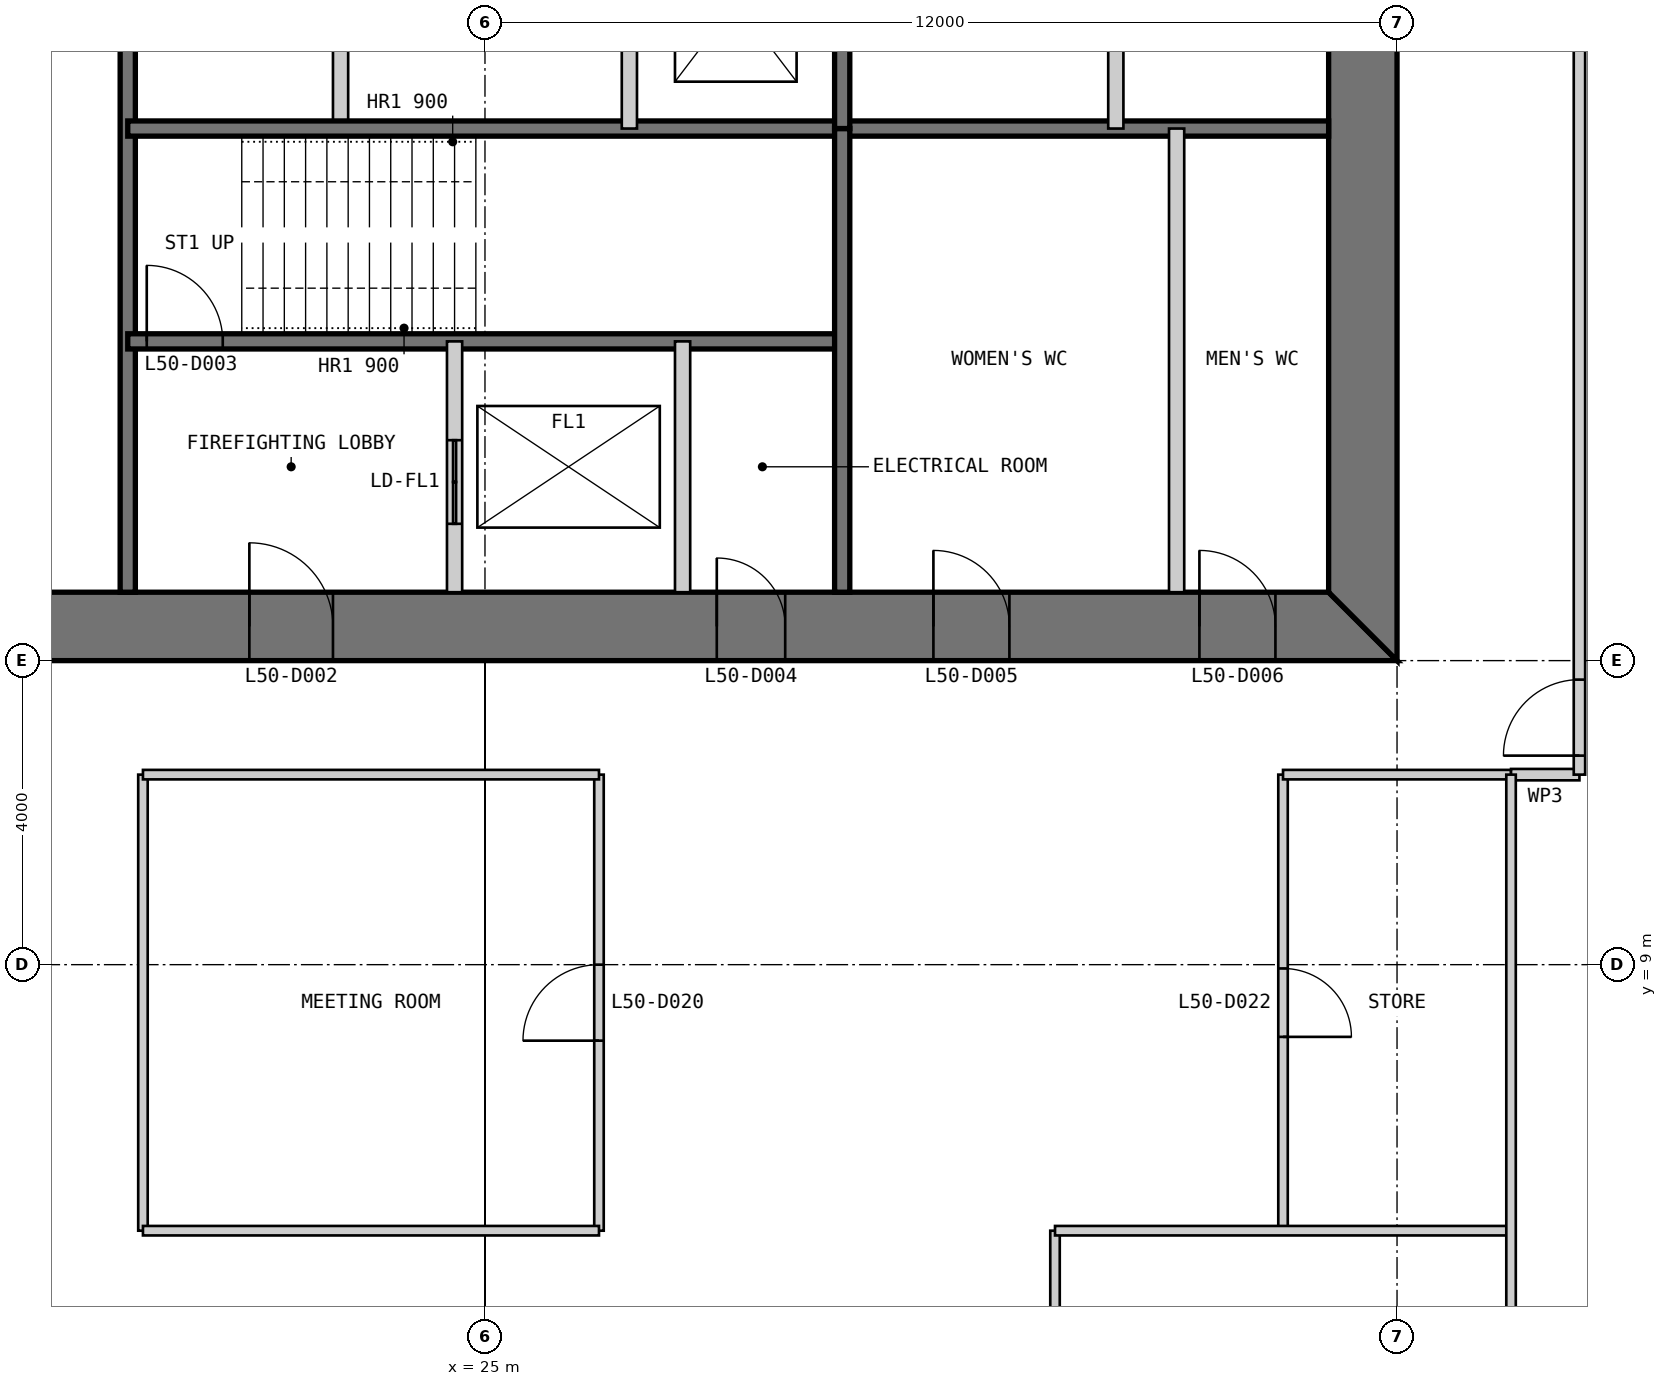
"""IFC4 building model, lengths in metres.
Left out: names, types, materials, properties, quantities, classifications, styles, units other than length and angle.
Written with IfcOpenShell. Run it as: python <this file> out.ifc"""

import sys

from ifc_helpers import new_model, si_unit, direction, frame, frame_2d, origin, place, context, subcontext, project, spatial, polyline, rectangle, outline, extrude, element, fill, save


model = new_model("IFC4")
c1 = context("Model", 3, precision=1e-05, world=origin(), true_north=direction((0.0, 1.0)))
c2 = subcontext(c1, "Body", "Model", "MODEL_VIEW")
j1 = project(units=[si_unit("LENGTHUNIT", "METRE"), si_unit("PLANEANGLEUNIT", "RADIAN")], contexts=[c1])
p1 = place(None, origin())
s1 = spatial("IfcSite", under=j1, at=p1, CompositionType="ELEMENT")
p2 = place(p1, origin())
s2 = spatial("IfcBuilding", under=s1, at=p2, CompositionType="ELEMENT")
p3 = place(p2, frame((0.0, 0.0, 213.8)))
s3 = spatial("IfcBuildingStorey", under=s2, at=p3, CompositionType="ELEMENT", Elevation=213.8)
p4 = place(p3, frame((13.0, 13.45, 0.0), z_axis=(0.0, 0.0, 1.0), x_axis=(1.0, 0.0, 0.0)))
e1 = element("IfcWall", 1, at=p4, inside=s3, PredefinedType="SHEAR", context=c2, shape_type="SweptSolid", body=[
    extrude(outline(polyline([(0.0, -0.45), (24.0, -0.45), (23.1, 0.45), (0.9, 0.45), (0.0, -0.45)])), origin(), (0.0, 0.0, 1.0), 4.0),
])
p5 = place(p4, frame((4.9, 0.0, 0.0)))
e2 = element("IfcOpeningElement", 2, at=p5, cuts=e1, PredefinedType="OPENING", context=c2, shape_type="SweptSolid", body=[
    extrude(rectangle(XDim=1.0, YDim=2.2, at=frame_2d((0.5, 1.1))), frame((0.0, 0.46, 0.0), z_axis=(0.0, -1.0, 0.0), x_axis=(1.0, 0.0, 0.0)), (0.0, 0.0, 1.0), 0.92),
])
p6 = place(p4, frame((8.9, 0.0, 0.0)))
e3 = element("IfcOpeningElement", 3, at=p6, cuts=e1, PredefinedType="OPENING", context=c2, shape_type="SweptSolid", body=[
    extrude(rectangle(XDim=1.1, YDim=2.2, at=frame_2d((0.55, 1.1))), frame((0.0, 0.46, 0.0), z_axis=(0.0, -1.0, 0.0), x_axis=(1.0, 0.0, 0.0)), (0.0, 0.0, 1.0), 0.92),
])
p7 = place(p4, frame((15.05, 0.0, 0.0)))
e4 = element("IfcOpeningElement", 4, at=p7, cuts=e1, PredefinedType="OPENING", context=c2, shape_type="SweptSolid", body=[
    extrude(rectangle(XDim=0.9, YDim=2.2, at=frame_2d((0.45, 1.1))), frame((0.0, 0.46, 0.0), z_axis=(0.0, -1.0, 0.0), x_axis=(1.0, 0.0, 0.0)), (0.0, 0.0, 1.0), 0.92),
])
p8 = place(p4, frame((17.9, 0.0, 0.0)))
e5 = element("IfcOpeningElement", 5, at=p8, cuts=e1, PredefinedType="OPENING", context=c2, shape_type="SweptSolid", body=[
    extrude(rectangle(XDim=1.0, YDim=2.2, at=frame_2d((0.5, 1.1))), frame((0.0, 0.46, 0.0), z_axis=(0.0, -1.0, 0.0), x_axis=(1.0, 0.0, 0.0)), (0.0, 0.0, 1.0), 0.92),
])
p9 = place(p4, frame((21.4, 0.0, 0.0)))
e6 = element("IfcOpeningElement", 6, at=p9, cuts=e1, PredefinedType="OPENING", context=c2, shape_type="SweptSolid", body=[
    extrude(rectangle(XDim=1.0, YDim=2.2, at=frame_2d((0.5, 1.1))), frame((0.0, 0.46, 0.0), z_axis=(0.0, -1.0, 0.0), x_axis=(1.0, 0.0, 0.0)), (0.0, 0.0, 1.0), 0.92),
])
p10 = place(p3, frame((36.55, 13.9, 0.0), z_axis=(0.0, 0.0, 1.0), x_axis=(0.0, 1.0, 0.0)))
e7 = element("IfcWall", 7, at=p10, inside=s3, PredefinedType="SHEAR", context=c2, shape_type="SweptSolid", body=[
    extrude(outline(polyline([(-0.9, -0.45), (23.1, -0.45), (22.2, 0.45), (0.0, 0.45), (-0.9, -0.45)])), origin(), (0.0, 0.0, 1.0), 4.0),
])
p11 = place(p10, frame((20.2, 0.0, 0.0)))
e8 = element("IfcOpeningElement", 8, at=p11, cuts=e7, PredefinedType="OPENING", context=c2, shape_type="SweptSolid", body=[
    extrude(rectangle(XDim=1.0, YDim=2.2, at=frame_2d((0.5, 1.1))), frame((0.0, 0.46, 0.0), z_axis=(0.0, -1.0, 0.0), x_axis=(1.0, 0.0, 0.0)), (0.0, 0.0, 1.0), 0.92),
])
p12 = place(p10, frame((17.25, 0.0, 0.0)))
e9 = element("IfcOpeningElement", 9, at=p12, cuts=e7, PredefinedType="OPENING", context=c2, shape_type="SweptSolid", body=[
    extrude(rectangle(XDim=0.9, YDim=2.2, at=frame_2d((0.45, 1.1))), frame((0.0, 0.46, 0.0), z_axis=(0.0, -1.0, 0.0), x_axis=(1.0, 0.0, 0.0)), (0.0, 0.0, 1.0), 0.92),
])
p13 = place(p3, frame((20.3, 13.9, 0.0), z_axis=(0.0, 0.0, 1.0), x_axis=(0.0, 1.0, 0.0)))
e10 = element("IfcWall", 10, at=p13, inside=s3, PredefinedType="SOLIDWALL", context=c2, shape_type="SweptSolid", body=[
    extrude(rectangle(XDim=16.1, YDim=0.2, at=frame_2d((8.05, 0.0))), origin(), (0.0, 0.0, 1.0), 3.8),
])
p14 = place(p13, frame((10.65, 0.0, 0.0)))
e11 = element("IfcOpeningElement", 11, at=p14, cuts=e10, PredefinedType="OPENING", context=c2, shape_type="SweptSolid", body=[
    extrude(rectangle(XDim=0.9, YDim=2.2, at=frame_2d((0.45, 1.1))), frame((0.0, 0.11, 0.0), z_axis=(0.0, -1.0, 0.0), x_axis=(1.0, 0.0, 0.0)), (0.0, 0.0, 1.0), 0.22),
])
p15 = place(p3, frame((23.1, 20.0, 0.0), z_axis=(0.0, 0.0, 1.0), x_axis=(0.0, 1.0, 0.0)))
e12 = element("IfcWall", 12, at=p15, inside=s3, PredefinedType="PARTITIONING", context=c2, shape_type="SweptSolid", body=[
    extrude(rectangle(XDim=10.0, YDim=0.2, at=frame_2d((5.0, 0.0))), origin(), (0.0, 0.0, 1.0), 3.8),
])
p16 = place(p3, frame((20.3, 17.2, 0.0), z_axis=(0.0, 0.0, 1.0), x_axis=(1.0, 0.0, 0.0)))
e13 = element("IfcWall", 13, at=p16, inside=s3, PredefinedType="SOLIDWALL", context=c2, shape_type="SweptSolid", body=[
    extrude(rectangle(XDim=9.4, YDim=0.2, at=frame_2d((4.7, 0.0))), origin(), (0.0, 0.0, 1.0), 3.8),
])
p17 = place(p16, frame((0.25, 0.0, 0.0)))
e14 = element("IfcOpeningElement", 14, at=p17, cuts=e13, PredefinedType="OPENING", context=c2, shape_type="SweptSolid", body=[
    extrude(rectangle(XDim=1.0, YDim=2.2, at=frame_2d((0.5, 1.1))), frame((0.0, 0.11, 0.0), z_axis=(0.0, -1.0, 0.0), x_axis=(1.0, 0.0, 0.0)), (0.0, 0.0, 1.0), 0.22),
])
p18 = place(p3, frame((20.3, 20.0, 0.0), z_axis=(0.0, 0.0, 1.0), x_axis=(1.0, 0.0, 0.0)))
e15 = element("IfcWall", 15, at=p18, inside=s3, PredefinedType="SOLIDWALL", context=c2, shape_type="SweptSolid", body=[
    extrude(rectangle(XDim=15.8, YDim=0.2, at=frame_2d((7.9, 0.0))), origin(), (0.0, 0.0, 1.0), 3.8),
])
p19 = place(p3, frame((24.6, 13.9, 0.0), z_axis=(0.0, 0.0, 1.0), x_axis=(0.0, 1.0, 0.0)))
e16 = element("IfcWall", 16, at=p19, inside=s3, PredefinedType="PARTITIONING", context=c2, shape_type="SweptSolid", body=[
    extrude(rectangle(XDim=3.3, YDim=0.2, at=frame_2d((1.65, 0.0))), origin(), (0.0, 0.0, 1.0), 3.8),
])
p20 = place(p19, frame((0.9, 0.0, 0.0)))
e17 = element("IfcOpeningElement", 17, at=p20, cuts=e16, PredefinedType="OPENING", context=c2, shape_type="SweptSolid", body=[
    extrude(rectangle(XDim=1.1, YDim=2.2, at=frame_2d((0.55, 1.1))), frame((0.0, 0.11, 0.0), z_axis=(0.0, -1.0, 0.0), x_axis=(1.0, 0.0, 0.0)), (0.0, 0.0, 1.0), 0.22),
])
p21 = place(p3, frame((27.6, 13.9, 0.0), z_axis=(0.0, 0.0, 1.0), x_axis=(0.0, 1.0, 0.0)))
e18 = element("IfcWall", 18, at=p21, inside=s3, PredefinedType="PARTITIONING", context=c2, shape_type="SweptSolid", body=[
    extrude(rectangle(XDim=3.3, YDim=0.2, at=frame_2d((1.65, 0.0))), origin(), (0.0, 0.0, 1.0), 3.8),
])
p22 = place(p3, frame((29.7, 13.9, 0.0), z_axis=(0.0, 0.0, 1.0), x_axis=(0.0, 1.0, 0.0)))
e19 = element("IfcWall", 19, at=p22, inside=s3, PredefinedType="SOLIDWALL", context=c2, shape_type="SweptSolid", body=[
    extrude(rectangle(XDim=6.1, YDim=0.2, at=frame_2d((3.05, 0.0))), origin(), (0.0, 0.0, 1.0), 3.8),
])
p23 = place(p3, frame((34.1, 13.9, 0.0), z_axis=(0.0, 0.0, 1.0), x_axis=(0.0, 1.0, 0.0)))
e20 = element("IfcWall", 20, at=p23, inside=s3, PredefinedType="PARTITIONING", context=c2, shape_type="SweptSolid", body=[
    extrude(rectangle(XDim=6.1, YDim=0.2, at=frame_2d((3.05, 0.0))), origin(), (0.0, 0.0, 1.0), 3.8),
])
p24 = place(p3, frame((33.3, 36.1, 0.0), z_axis=(0.0, 0.0, 1.0), x_axis=(0.0, -1.0, 0.0)))
e21 = element("IfcWall", 21, at=p24, inside=s3, PredefinedType="PARTITIONING", context=c2, shape_type="SweptSolid", body=[
    extrude(rectangle(XDim=16.1, YDim=0.2, at=frame_2d((8.05, 0.0))), origin(), (0.0, 0.0, 1.0), 3.8),
])
p25 = place(p3, frame((29.7, 36.1, 0.0), z_axis=(0.0, 0.0, 1.0), x_axis=(0.0, -1.0, 0.0)))
e22 = element("IfcWall", 22, at=p25, inside=s3, PredefinedType="SOLIDWALL", context=c2, shape_type="SweptSolid", body=[
    extrude(rectangle(XDim=16.1, YDim=0.2, at=frame_2d((8.05, 0.0))), origin(), (0.0, 0.0, 1.0), 3.8),
])
p26 = place(p25, frame((7.217, 0.0, 0.0)))
e23 = element("IfcOpeningElement", 23, at=p26, cuts=e22, PredefinedType="OPENING", context=c2, shape_type="SweptSolid", body=[
    extrude(rectangle(XDim=1.1, YDim=2.2, at=frame_2d((0.55, 1.1))), frame((0.0, 0.11, 0.0), z_axis=(0.0, -1.0, 0.0), x_axis=(1.0, 0.0, 0.0)), (0.0, 0.0, 1.0), 0.22),
])
p27 = place(p25, frame((10.55, 0.0, 0.0)))
e24 = element("IfcOpeningElement", 24, at=p27, cuts=e22, PredefinedType="OPENING", context=c2, shape_type="SweptSolid", body=[
    extrude(rectangle(XDim=1.1, YDim=2.2, at=frame_2d((0.55, 1.1))), frame((0.0, 0.11, 0.0), z_axis=(0.0, -1.0, 0.0), x_axis=(1.0, 0.0, 0.0)), (0.0, 0.0, 1.0), 0.22),
])
p28 = place(p25, frame((13.883, 0.0, 0.0)))
e25 = element("IfcOpeningElement", 25, at=p28, cuts=e22, PredefinedType="OPENING", context=c2, shape_type="SweptSolid", body=[
    extrude(rectangle(XDim=1.1, YDim=2.2, at=frame_2d((0.55, 1.1))), frame((0.0, 0.11, 0.0), z_axis=(0.0, -1.0, 0.0), x_axis=(1.0, 0.0, 0.0)), (0.0, 0.0, 1.0), 0.22),
])
p29 = place(p3, frame((26.9, 30.0, 0.0), z_axis=(0.0, 0.0, 1.0), x_axis=(0.0, -1.0, 0.0)))
e26 = element("IfcWall", 26, at=p29, inside=s3, PredefinedType="PARTITIONING", context=c2, shape_type="SweptSolid", body=[
    extrude(rectangle(XDim=10.0, YDim=0.2, at=frame_2d((5.0, 0.0))), origin(), (0.0, 0.0, 1.0), 3.8),
])
p30 = place(p3, frame((20.5, 5.5, 0.0), z_axis=(0.0, 0.0, 1.0), x_axis=(0.0, 1.0, 0.0)))
e27 = element("IfcWall", 27, at=p30, inside=s3, PredefinedType="PARTITIONING", context=c2, shape_type="SweptSolid", body=[
    extrude(rectangle(XDim=6.0, YDim=0.125, at=frame_2d((3.0, 0.0))), origin(), (0.0, 0.0, 1.0), 3.85),
])
p31 = place(p3, frame((26.5, 5.5, 0.0), z_axis=(0.0, 0.0, 1.0), x_axis=(0.0, 1.0, 0.0)))
e28 = element("IfcWall", 28, at=p31, inside=s3, PredefinedType="PARTITIONING", context=c2, shape_type="SweptSolid", body=[
    extrude(rectangle(XDim=6.0, YDim=0.125, at=frame_2d((3.0, 0.0))), origin(), (0.0, 0.0, 1.0), 3.85),
])
p32 = place(p31, frame((2.5, 0.0, 0.0)))
e29 = element("IfcOpeningElement", 29, at=p32, cuts=e28, PredefinedType="OPENING", context=c2, shape_type="SweptSolid", body=[
    extrude(rectangle(XDim=1.0, YDim=2.2, at=frame_2d((0.5, 1.1))), frame((0.0, 0.073, 0.0), z_axis=(0.0, -1.0, 0.0), x_axis=(1.0, 0.0, 0.0)), (0.0, 0.0, 1.0), 0.145),
])
p33 = place(p3, frame((32.5, 0.15, 0.0), z_axis=(0.0, 0.0, 1.0), x_axis=(0.0, 1.0, 0.0)))
e30 = element("IfcWall", 30, at=p33, inside=s3, PredefinedType="PARTITIONING", context=c2, shape_type="SweptSolid", body=[
    extrude(rectangle(XDim=5.35, YDim=0.125, at=frame_2d((2.675, 0.0))), origin(), (0.0, 0.0, 1.0), 3.85),
])
p34 = place(p33, frame((3.4, 0.0, 0.0)))
e31 = element("IfcOpeningElement", 31, at=p34, cuts=e30, PredefinedType="OPENING", context=c2, shape_type="SweptSolid", body=[
    extrude(rectangle(XDim=0.9, YDim=2.2, at=frame_2d((0.45, 1.1))), frame((0.0, 0.073, 0.0), z_axis=(0.0, -1.0, 0.0), x_axis=(1.0, 0.0, 0.0)), (0.0, 0.0, 1.0), 0.145),
])
p35 = place(p3, frame((35.5, 5.5, 0.0), z_axis=(0.0, 0.0, 1.0), x_axis=(0.0, 1.0, 0.0)))
e32 = element("IfcWall", 32, at=p35, inside=s3, PredefinedType="PARTITIONING", context=c2, shape_type="SweptSolid", body=[
    extrude(rectangle(XDim=6.0, YDim=0.125, at=frame_2d((3.0, 0.0))), origin(), (0.0, 0.0, 1.0), 3.85),
])
p36 = place(p35, frame((2.55, 0.0, 0.0)))
e33 = element("IfcOpeningElement", 33, at=p36, cuts=e32, PredefinedType="OPENING", context=c2, shape_type="SweptSolid", body=[
    extrude(rectangle(XDim=0.9, YDim=2.2, at=frame_2d((0.45, 1.1))), frame((0.0, 0.073, 0.0), z_axis=(0.0, -1.0, 0.0), x_axis=(1.0, 0.0, 0.0)), (0.0, 0.0, 1.0), 0.145),
])
for number, where, z_axis, x_axis in (
    (34, (20.5, 5.5, 0.0), (0.0, 0.0, 1.0), (1.0, 0.0, 0.0)),
    (35, (32.5, 5.5, 0.0), (0.0, 0.0, 1.0), (1.0, 0.0, 0.0)),
    (36, (20.5, 11.5, 0.0), (0.0, 0.0, 1.0), (1.0, 0.0, 0.0)),
):
    element("IfcWall", number, at=place(p3, frame(where, z_axis=z_axis, x_axis=x_axis)), inside=s3, PredefinedType="PARTITIONING", context=c2, shape_type="SweptSolid", body=[
        extrude(rectangle(XDim=6.0, YDim=0.125, at=frame_2d((3.0, 0.0))), origin(), (0.0, 0.0, 1.0), 3.85),
    ])
p37 = place(p3, frame((35.5, 11.5, 0.0), z_axis=(0.0, 0.0, 1.0), x_axis=(1.0, 0.0, 0.0)))
e37 = element("IfcWall", 37, at=p37, inside=s3, PredefinedType="PARTITIONING", context=c2, shape_type="SweptSolid", body=[
    extrude(rectangle(XDim=3.0, YDim=0.125, at=frame_2d((1.5, 0.0))), origin(), (0.0, 0.0, 1.0), 3.85),
])
p38 = place(p3, frame((38.5, 11.5, 0.0), z_axis=(0.0, 0.0, 1.0), x_axis=(1.0, 0.0, 0.0)))
e38 = element("IfcWall", 38, at=p38, inside=s3, PredefinedType="PARTITIONING", context=c2, shape_type="SweptSolid", body=[
    extrude(rectangle(XDim=0.9, YDim=0.15, at=frame_2d((0.45, 0.0))), origin(), (0.0, 0.0, 1.0), 3.85),
])
p39 = place(p3, frame((39.4, 11.5, 0.0), z_axis=(0.0, 0.0, 1.0), x_axis=(0.0, 1.0, 0.0)))
e39 = element("IfcWall", 39, at=p39, inside=s3, PredefinedType="PARTITIONING", context=c2, shape_type="SweptSolid", body=[
    extrude(rectangle(XDim=27.0, YDim=0.15, at=frame_2d((13.5, 0.0))), origin(), (0.0, 0.0, 1.0), 3.85),
])
p40 = place(p39, frame((0.25, 0.0, 0.0)))
e40 = element("IfcOpeningElement", 40, at=p40, cuts=e39, PredefinedType="OPENING", context=c2, shape_type="SweptSolid", body=[
    extrude(rectangle(XDim=1.0, YDim=2.2, at=frame_2d((0.5, 1.1))), frame((0.0, 0.085, 0.0), z_axis=(0.0, -1.0, 0.0), x_axis=(1.0, 0.0, 0.0)), (0.0, 0.0, 1.0), 0.17),
])
p41 = place(p39, frame((22.75, 0.0, 0.0)))
e41 = element("IfcOpeningElement", 41, at=p41, cuts=e39, PredefinedType="OPENING", context=c2, shape_type="SweptSolid", body=[
    extrude(rectangle(XDim=1.0, YDim=2.2, at=frame_2d((0.5, 1.1))), frame((0.0, 0.085, 0.0), z_axis=(0.0, -1.0, 0.0), x_axis=(1.0, 0.0, 0.0)), (0.0, 0.0, 1.0), 0.17),
])
p42 = place(p3, frame((38.5, 0.15, 0.0), z_axis=(0.0, 0.0, 1.0), x_axis=(0.0, 1.0, 0.0)))
e42 = element("IfcWall", 42, at=p42, inside=s3, PredefinedType="PARTITIONING", context=c2, shape_type="SweptSolid", body=[
    extrude(rectangle(XDim=11.35, YDim=0.125, at=frame_2d((5.675, 0.0))), origin(), (0.0, 0.0, 1.0), 3.85),
])
p43 = place(p6, origin())
e43 = element("IfcDoor", 43, at=p43, inside=s3, OperationType="SINGLE_SWING_LEFT", PredefinedType="DOOR", context=c2, shape_type="SweptSolid", body=[
    extrude(rectangle(XDim=1.1, YDim=2.2, at=frame_2d((0.55, 1.1))), frame((0.0, 0.025, 0.0), z_axis=(0.0, -1.0, 0.0), x_axis=(1.0, 0.0, 0.0)), (0.0, 0.0, 1.0), 0.05),
    extrude(outline(polyline([(0.0, 0.0), (0.04, 0.0), (0.04, 2.16), (1.06, 2.16), (1.06, 0.0), (1.1, 0.0), (1.1, 2.2), (0.0, 2.2), (0.0, 0.0)])), frame((0.0, 0.3, 0.0), z_axis=(0.0, -1.0, 0.0), x_axis=(1.0, 0.0, 0.0)), (0.0, 0.0, 1.0), 0.6),
])
fill(e3, e43)
p44 = place(p17, origin())
e44 = element("IfcDoor", 44, at=p44, inside=s3, OperationType="SINGLE_SWING_LEFT", PredefinedType="DOOR", context=c2, shape_type="SweptSolid", body=[
    extrude(rectangle(XDim=1.0, YDim=2.2, at=frame_2d((0.5, 1.1))), frame((0.0, 0.025, 0.0), z_axis=(0.0, -1.0, 0.0), x_axis=(1.0, 0.0, 0.0)), (0.0, 0.0, 1.0), 0.05),
])
fill(e14, e44)
p45 = place(p7, origin())
e45 = element("IfcDoor", 45, at=p45, inside=s3, OperationType="SINGLE_SWING_LEFT", PredefinedType="DOOR", context=c2, shape_type="SweptSolid", body=[
    extrude(rectangle(XDim=0.9, YDim=2.2, at=frame_2d((0.45, 1.1))), frame((0.0, 0.025, 0.0), z_axis=(0.0, -1.0, 0.0), x_axis=(1.0, 0.0, 0.0)), (0.0, 0.0, 1.0), 0.05),
    extrude(outline(polyline([(0.0, 0.0), (0.04, 0.0), (0.04, 2.16), (0.86, 2.16), (0.86, 0.0), (0.9, 0.0), (0.9, 2.2), (0.0, 2.2), (0.0, 0.0)])), frame((0.0, 0.3, 0.0), z_axis=(0.0, -1.0, 0.0), x_axis=(1.0, 0.0, 0.0)), (0.0, 0.0, 1.0), 0.6),
])
fill(e4, e45)
p46 = place(p8, origin())
e46 = element("IfcDoor", 46, at=p46, inside=s3, OperationType="SINGLE_SWING_LEFT", PredefinedType="DOOR", context=c2, shape_type="SweptSolid", body=[
    extrude(rectangle(XDim=1.0, YDim=2.2, at=frame_2d((0.5, 1.1))), frame((0.0, 0.025, 0.0), z_axis=(0.0, -1.0, 0.0), x_axis=(1.0, 0.0, 0.0)), (0.0, 0.0, 1.0), 0.05),
    extrude(outline(polyline([(0.0, 0.0), (0.04, 0.0), (0.04, 2.16), (0.96, 2.16), (0.96, 0.0), (1.0, 0.0), (1.0, 2.2), (0.0, 2.2), (0.0, 0.0)])), frame((0.0, 0.3, 0.0), z_axis=(0.0, -1.0, 0.0), x_axis=(1.0, 0.0, 0.0)), (0.0, 0.0, 1.0), 0.6),
])
fill(e5, e46)
p47 = place(p9, origin())
e47 = element("IfcDoor", 47, at=p47, inside=s3, OperationType="SINGLE_SWING_LEFT", PredefinedType="DOOR", context=c2, shape_type="SweptSolid", body=[
    extrude(rectangle(XDim=1.0, YDim=2.2, at=frame_2d((0.5, 1.1))), frame((0.0, 0.025, 0.0), z_axis=(0.0, -1.0, 0.0), x_axis=(1.0, 0.0, 0.0)), (0.0, 0.0, 1.0), 0.05),
    extrude(outline(polyline([(0.0, 0.0), (0.04, 0.0), (0.04, 2.16), (0.96, 2.16), (0.96, 0.0), (1.0, 0.0), (1.0, 2.2), (0.0, 2.2), (0.0, 0.0)])), frame((0.0, 0.3, 0.0), z_axis=(0.0, -1.0, 0.0), x_axis=(1.0, 0.0, 0.0)), (0.0, 0.0, 1.0), 0.6),
])
fill(e6, e47)
p48 = place(p32, origin())
e48 = element("IfcDoor", 48, at=p48, inside=s3, OperationType="SINGLE_SWING_LEFT", PredefinedType="DOOR", context=c2, shape_type="SweptSolid", body=[
    extrude(rectangle(XDim=1.0, YDim=2.2, at=frame_2d((0.5, 1.1))), frame((0.0, 0.025, 0.0), z_axis=(0.0, -1.0, 0.0), x_axis=(1.0, 0.0, 0.0)), (0.0, 0.0, 1.0), 0.05),
])
fill(e29, e48)
p49 = place(p36, frame((0.9, 0.0, 0.0), z_axis=(0.0, 0.0, 1.0), x_axis=(-1.0, 0.0, 0.0)))
e49 = element("IfcDoor", 49, at=p49, inside=s3, OperationType="SINGLE_SWING_RIGHT", PredefinedType="DOOR", context=c2, shape_type="SweptSolid", body=[
    extrude(rectangle(XDim=0.9, YDim=2.2, at=frame_2d((0.45, 1.1))), frame((0.0, 0.025, 0.0), z_axis=(0.0, -1.0, 0.0), x_axis=(1.0, 0.0, 0.0)), (0.0, 0.0, 1.0), 0.05),
])
fill(e33, e49)
p50 = place(p40, origin())
e50 = element("IfcDoor", 50, at=p50, inside=s3, OperationType="SINGLE_SWING_LEFT", PredefinedType="DOOR", context=c2, shape_type="SweptSolid", body=[
    extrude(rectangle(XDim=1.0, YDim=2.2, at=frame_2d((0.5, 1.1))), frame((0.0, 0.025, 0.0), z_axis=(0.0, -1.0, 0.0), x_axis=(1.0, 0.0, 0.0)), (0.0, 0.0, 1.0), 0.05),
])
fill(e40, e50)
p51 = place(p20, origin())
e51 = element("IfcDoor", 51, at=p51, inside=s3, OperationType="DOUBLE_DOOR_SLIDING", PredefinedType="DOOR", context=c2, shape_type="SweptSolid", body=[
    extrude(rectangle(XDim=1.1, YDim=2.2, at=frame_2d((0.55, 1.1))), frame((0.0, 0.025, 0.0), z_axis=(0.0, -1.0, 0.0), x_axis=(1.0, 0.0, 0.0)), (0.0, 0.0, 1.0), 0.05),
])
fill(e17, e51)
save(model, sys.argv[1])
